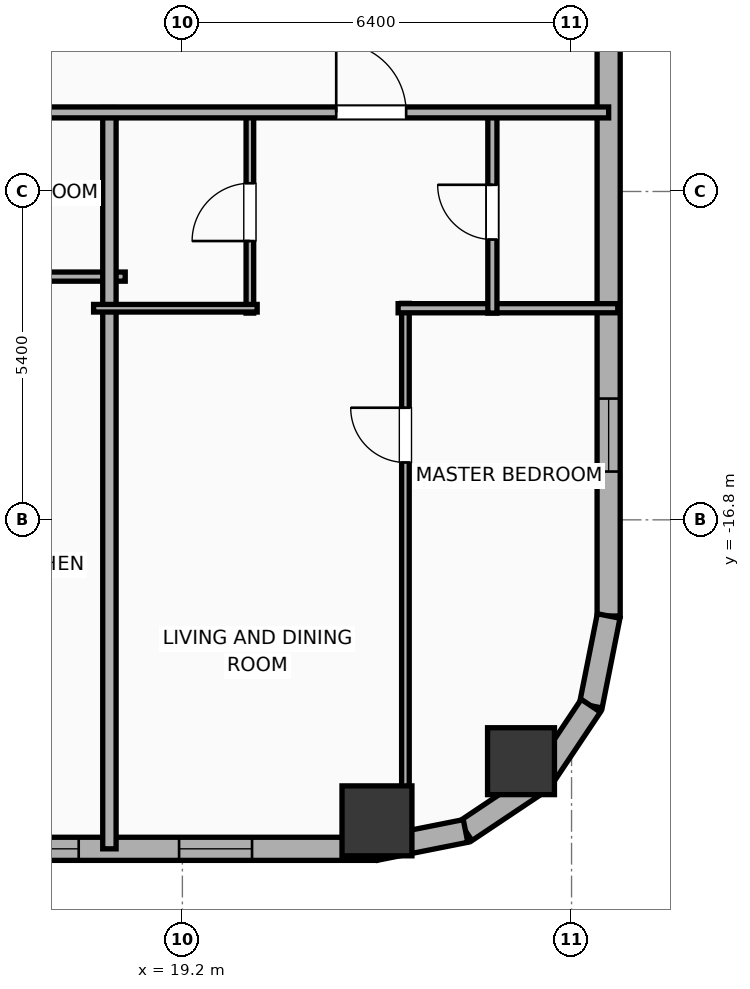
"""IFC4 building model, lengths in metres.
Left out: names, types, materials, properties, quantities, classifications, styles, units other than length and angle.
Written with IfcOpenShell. Run it as: python <this file> out.ifc"""

import sys

from ifc_helpers import new_model, si_unit, direction, frame, frame_2d, origin, origin_2d, place, context, subcontext, project, spatial, rectangle, hollow_rectangle, hollow_circle, extrude, element, fill, save


model = new_model("IFC4")
c1 = context("Model", 3, precision=1e-05, world=origin(), true_north=direction((0.0, 1.0)))
c2 = subcontext(c1, "Body", "Model", "MODEL_VIEW")
j1 = project(units=[si_unit("LENGTHUNIT", "METRE"), si_unit("PLANEANGLEUNIT", "RADIAN")], contexts=[c1])
p1 = place(None, origin())
s1 = spatial("IfcSite", under=j1, at=p1, CompositionType="ELEMENT")
p2 = place(p1, origin())
s2 = spatial("IfcBuilding", under=s1, at=p2, CompositionType="ELEMENT")
p3 = place(p2, frame((0.0, 0.0, 68.9)))
s3 = spatial("IfcBuildingStorey", under=s2, at=p3, CompositionType="ELEMENT", Elevation=68.9)
p4 = place(p3, frame((22.4, -21.75, 0.0), z_axis=(0.0, 0.0, 1.0), x_axis=(1.0, 0.0, 0.0)))
e1 = element("IfcColumn", 1, at=p4, inside=s3, PredefinedType="COLUMN", context=c2, shape_type="SweptSolid", body=[
    extrude(hollow_rectangle(XDim=1.15, YDim=1.15, WallThickness=0.04, at=origin_2d()), origin(), (0.0, 0.0, 1.0), 3.9),
])
p5 = place(p3, frame((24.769, -20.769, 0.0), z_axis=(0.0, 0.0, 1.0), x_axis=(1.0, 0.0, 0.0)))
e2 = element("IfcColumn", 2, at=p5, inside=s3, PredefinedType="COLUMN", context=c2, shape_type="SweptSolid", body=[
    extrude(hollow_circle(Radius=0.55, WallThickness=0.036, at=origin_2d()), origin(), (0.0, 0.0, 1.0), 3.9),
])
p6 = place(p3, frame((22.381, -22.21, 0.0), z_axis=(0.0, 0.0, 1.0), x_axis=(-1.0, 0.0, 0.0)))
e3 = element("IfcWall", 3, at=p6, inside=s3, PredefinedType="ELEMENTEDWALL", context=c2, shape_type="SweptSolid", body=[
    extrude(rectangle(XDim=51.963, YDim=0.38, at=frame_2d((25.981, 0.0))), origin(), (0.0, 0.0, 1.0), 3.65),
])
p7 = place(p6, frame((49.127, 0.0, 0.75)))
e4 = element("IfcOpeningElement", 4, at=p7, cuts=e3, PredefinedType="OPENING", context=c2, shape_type="SweptSolid", body=[
    extrude(rectangle(XDim=1.2, YDim=2.05, at=frame_2d((0.6, 1.025))), frame((0.0, 0.2, 0.0), z_axis=(0.0, -1.0, 0.0), x_axis=(1.0, 0.0, 0.0)), (0.0, 0.0, 1.0), 0.4),
])
p8 = place(p6, frame((43.926, 0.0, 0.75)))
e5 = element("IfcOpeningElement", 5, at=p8, cuts=e3, PredefinedType="OPENING", context=c2, shape_type="SweptSolid", body=[
    extrude(rectangle(XDim=1.2, YDim=2.05, at=frame_2d((0.6, 1.025))), frame((0.0, 0.2, 0.0), z_axis=(0.0, -1.0, 0.0), x_axis=(1.0, 0.0, 0.0)), (0.0, 0.0, 1.0), 0.4),
])
p9 = place(p6, frame((46.676, 0.0, 0.75)))
e6 = element("IfcOpeningElement", 6, at=p9, cuts=e3, PredefinedType="OPENING", context=c2, shape_type="SweptSolid", body=[
    extrude(rectangle(XDim=1.2, YDim=2.05, at=frame_2d((0.6, 1.025))), frame((0.0, 0.2, 0.0), z_axis=(0.0, -1.0, 0.0), x_axis=(1.0, 0.0, 0.0)), (0.0, 0.0, 1.0), 0.4),
])
p10 = place(p6, frame((39.531, 0.0, 0.75)))
e7 = element("IfcOpeningElement", 7, at=p10, cuts=e3, PredefinedType="OPENING", context=c2, shape_type="SweptSolid", body=[
    extrude(rectangle(XDim=1.2, YDim=2.05, at=frame_2d((0.6, 1.025))), frame((0.0, 0.2, 0.0), z_axis=(0.0, -1.0, 0.0), x_axis=(1.0, 0.0, 0.0)), (0.0, 0.0, 1.0), 0.4),
])
p11 = place(p6, frame((32.926, 0.0, 0.75)))
e8 = element("IfcOpeningElement", 8, at=p11, cuts=e3, PredefinedType="OPENING", context=c2, shape_type="SweptSolid", body=[
    extrude(rectangle(XDim=1.2, YDim=2.05, at=frame_2d((0.6, 1.025))), frame((0.0, 0.2, 0.0), z_axis=(0.0, -1.0, 0.0), x_axis=(1.0, 0.0, 0.0)), (0.0, 0.0, 1.0), 0.4),
])
p12 = place(p6, frame((35.676, 0.0, 0.75)))
e9 = element("IfcOpeningElement", 9, at=p12, cuts=e3, PredefinedType="OPENING", context=c2, shape_type="SweptSolid", body=[
    extrude(rectangle(XDim=1.2, YDim=2.05, at=frame_2d((0.6, 1.025))), frame((0.0, 0.2, 0.0), z_axis=(0.0, -1.0, 0.0), x_axis=(1.0, 0.0, 0.0)), (0.0, 0.0, 1.0), 0.4),
])
p13 = place(p6, frame((28.531, 0.0, 0.75)))
e10 = element("IfcOpeningElement", 10, at=p13, cuts=e3, PredefinedType="OPENING", context=c2, shape_type="SweptSolid", body=[
    extrude(rectangle(XDim=1.2, YDim=2.05, at=frame_2d((0.6, 1.025))), frame((0.0, 0.2, 0.0), z_axis=(0.0, -1.0, 0.0), x_axis=(1.0, 0.0, 0.0)), (0.0, 0.0, 1.0), 0.4),
])
p14 = place(p6, frame((21.926, 0.0, 0.75)))
e11 = element("IfcOpeningElement", 11, at=p14, cuts=e3, PredefinedType="OPENING", context=c2, shape_type="SweptSolid", body=[
    extrude(rectangle(XDim=1.2, YDim=2.05, at=frame_2d((0.6, 1.025))), frame((0.0, 0.2, 0.0), z_axis=(0.0, -1.0, 0.0), x_axis=(1.0, 0.0, 0.0)), (0.0, 0.0, 1.0), 0.4),
])
p15 = place(p6, frame((24.676, 0.0, 0.75)))
e12 = element("IfcOpeningElement", 12, at=p15, cuts=e3, PredefinedType="OPENING", context=c2, shape_type="SweptSolid", body=[
    extrude(rectangle(XDim=1.2, YDim=2.05, at=frame_2d((0.6, 1.025))), frame((0.0, 0.2, 0.0), z_axis=(0.0, -1.0, 0.0), x_axis=(1.0, 0.0, 0.0)), (0.0, 0.0, 1.0), 0.4),
])
p16 = place(p6, frame((18.636, 0.0, 0.75)))
e13 = element("IfcOpeningElement", 13, at=p16, cuts=e3, PredefinedType="OPENING", context=c2, shape_type="SweptSolid", body=[
    extrude(rectangle(XDim=1.2, YDim=2.05, at=frame_2d((0.6, 1.025))), frame((0.0, 0.2, 0.0), z_axis=(0.0, -1.0, 0.0), x_axis=(1.0, 0.0, 0.0)), (0.0, 0.0, 1.0), 0.4),
])
p17 = place(p6, frame((15.886, 0.0, 0.75)))
e14 = element("IfcOpeningElement", 14, at=p17, cuts=e3, PredefinedType="OPENING", context=c2, shape_type="SweptSolid", body=[
    extrude(rectangle(XDim=1.2, YDim=2.05, at=frame_2d((0.6, 1.025))), frame((0.0, 0.2, 0.0), z_axis=(0.0, -1.0, 0.0), x_axis=(1.0, 0.0, 0.0)), (0.0, 0.0, 1.0), 0.4),
])
p18 = place(p6, frame((12.031, 0.0, 0.75)))
e15 = element("IfcOpeningElement", 15, at=p18, cuts=e3, PredefinedType="OPENING", context=c2, shape_type="SweptSolid", body=[
    extrude(rectangle(XDim=1.2, YDim=2.05, at=frame_2d((0.6, 1.025))), frame((0.0, 0.2, 0.0), z_axis=(0.0, -1.0, 0.0), x_axis=(1.0, 0.0, 0.0)), (0.0, 0.0, 1.0), 0.4),
])
p19 = place(p6, frame((7.636, 0.0, 0.75)))
e16 = element("IfcOpeningElement", 16, at=p19, cuts=e3, PredefinedType="OPENING", context=c2, shape_type="SweptSolid", body=[
    extrude(rectangle(XDim=1.2, YDim=2.05, at=frame_2d((0.6, 1.025))), frame((0.0, 0.2, 0.0), z_axis=(0.0, -1.0, 0.0), x_axis=(1.0, 0.0, 0.0)), (0.0, 0.0, 1.0), 0.4),
])
p20 = place(p6, frame((4.886, 0.0, 0.75)))
e17 = element("IfcOpeningElement", 17, at=p20, cuts=e3, PredefinedType="OPENING", context=c2, shape_type="SweptSolid", body=[
    extrude(rectangle(XDim=1.2, YDim=2.05, at=frame_2d((0.6, 1.025))), frame((0.0, 0.2, 0.0), z_axis=(0.0, -1.0, 0.0), x_axis=(1.0, 0.0, 0.0)), (0.0, 0.0, 1.0), 0.4),
])
p21 = place(p6, frame((2.036, 0.0, 0.75)))
e18 = element("IfcOpeningElement", 18, at=p21, cuts=e3, PredefinedType="OPENING", context=c2, shape_type="SweptSolid", body=[
    extrude(rectangle(XDim=1.2, YDim=2.05, at=frame_2d((0.6, 1.025))), frame((0.0, 0.2, 0.0), z_axis=(0.0, -1.0, 0.0), x_axis=(1.0, 0.0, 0.0)), (0.0, 0.0, 1.0), 0.4),
])
p22 = place(p3, frame((26.21, 18.381, 0.0), z_axis=(0.0, 0.0, 1.0), x_axis=(0.0, -1.0, 0.0)))
e19 = element("IfcWall", 19, at=p22, inside=s3, PredefinedType="ELEMENTEDWALL", context=c2, shape_type="SweptSolid", body=[
    extrude(rectangle(XDim=36.763, YDim=0.38, at=frame_2d((18.381, 0.0))), origin(), (0.0, 0.0, 1.0), 3.65),
])
p23 = place(p22, frame((33.187, 0.0, 0.75)))
e20 = element("IfcOpeningElement", 20, at=p23, cuts=e19, PredefinedType="OPENING", context=c2, shape_type="SweptSolid", body=[
    extrude(rectangle(XDim=1.2, YDim=2.05, at=frame_2d((0.6, 1.025))), frame((0.0, 0.2, 0.0), z_axis=(0.0, -1.0, 0.0), x_axis=(1.0, 0.0, 0.0)), (0.0, 0.0, 1.0), 0.4),
])
p24 = place(p3, frame((26.21, -18.381, 0.0), z_axis=(0.0, 0.0, 1.0), x_axis=(-0.195086038585, -0.980786132421, 0.0)))
e21 = element("IfcWall", 21, at=p24, inside=s3, PredefinedType="ELEMENTEDWALL", context=c2, shape_type="SweptSolid", body=[
    extrude(rectangle(XDim=1.504, YDim=0.38, at=frame_2d((0.752, 0.0))), origin(), (0.0, 0.0, 1.0), 3.65),
])
for number, where, z_axis, x_axis in (
    (22, (25.917, -19.857, 0.0), (0.0, 0.0, 1.0), (-0.556, -0.831, 0.0)),
    (23, (25.091, -21.091, 0.0), (0.0, 0.0, 1.0), (-0.831, -0.556, 0.0)),
):
    element("IfcWall", number, at=place(p3, frame(where, z_axis=z_axis, x_axis=x_axis)), inside=s3, PredefinedType="ELEMENTEDWALL", context=c2, shape_type="SweptSolid", body=[
        extrude(rectangle(XDim=1.485, YDim=0.38, at=frame_2d((0.743, 0.0))), origin(), (0.0, 0.0, 1.0), 3.65),
    ])
p25 = place(p3, frame((23.857, -21.917, 0.0), z_axis=(0.0, 0.0, 1.0), x_axis=(-0.980786132421, -0.195086038585, 0.0)))
e24 = element("IfcWall", 24, at=p25, inside=s3, PredefinedType="ELEMENTEDWALL", context=c2, shape_type="SweptSolid", body=[
    extrude(rectangle(XDim=1.504, YDim=0.38, at=frame_2d((0.752, 0.0))), origin(), (0.0, 0.0, 1.0), 3.65),
])
p26 = place(p3, frame((15.71, -12.8, 0.0), z_axis=(0.0, 0.0, 1.0), x_axis=(1.0, 0.0, 0.0)))
e25 = element("IfcWall", 25, at=p26, inside=s3, PredefinedType="PLUMBINGWALL", context=c2, shape_type="SweptSolid", body=[
    extrude(rectangle(XDim=2.55, YDim=0.15, at=frame_2d((1.275, 0.0))), origin(), (0.0, 0.0, 1.0), 3.65),
])
p27 = place(p3, frame((18.0, -22.21, 0.0), z_axis=(0.0, 0.0, 1.0), x_axis=(0.0, 1.0, 0.0)))
e26 = element("IfcWall", 26, at=p27, inside=s3, PredefinedType="PARTITIONING", context=c2, shape_type="SweptSolid", body=[
    extrude(rectangle(XDim=12.19, YDim=0.22, at=frame_2d((6.095, 0.0))), origin(), (0.0, 0.0, 1.0), 3.65),
])
p28 = place(p3, frame((22.868, -22.266, 0.0), z_axis=(0.0, 0.0, 1.0), x_axis=(0.0, 1.0, 0.0)))
e27 = element("IfcWall", 27, at=p28, inside=s3, PredefinedType="PARTITIONING", context=c2, shape_type="SweptSolid", body=[
    extrude(rectangle(XDim=9.026, YDim=0.125, at=frame_2d((4.513, 0.0))), origin(), (0.0, 0.0, 1.0), 3.65),
])
p29 = place(p28, frame((6.41, 0.0, 0.0)))
e28 = element("IfcOpeningElement", 28, at=p29, cuts=e27, PredefinedType="OPENING", context=c2, shape_type="SweptSolid", body=[
    extrude(rectangle(XDim=0.9, YDim=2.05, at=frame_2d((0.45, 1.025))), frame((0.0, 0.073, 0.0), z_axis=(0.0, -1.0, 0.0), x_axis=(1.0, 0.0, 0.0)), (0.0, 0.0, 1.0), 0.145),
])
p30 = place(p3, frame((22.748, -13.32, 0.0), z_axis=(0.0, 0.0, 1.0), x_axis=(1.0, 0.0, 0.0)))
e29 = element("IfcWall", 29, at=p30, inside=s3, PredefinedType="PLUMBINGWALL", context=c2, shape_type="SweptSolid", body=[
    extrude(rectangle(XDim=3.612, YDim=0.15, at=frame_2d((1.806, 0.0))), origin(), (0.0, 0.0, 1.0), 3.65),
])
p31 = place(p3, frame((20.31, -13.4, 0.0), z_axis=(0.0, 0.0, 1.0), x_axis=(0.0, 1.0, 0.0)))
e30 = element("IfcWall", 30, at=p31, inside=s3, PredefinedType="PARTITIONING", context=c2, shape_type="SweptSolid", body=[
    extrude(rectangle(XDim=3.32, YDim=0.125, at=frame_2d((1.66, 0.0))), origin(), (0.0, 0.0, 1.0), 2.94),
])
p32 = place(p31, frame((1.185, 0.0, 0.0)))
e31 = element("IfcOpeningElement", 31, at=p32, cuts=e30, PredefinedType="OPENING", context=c2, shape_type="SweptSolid", body=[
    extrude(rectangle(XDim=0.95, YDim=2.05, at=frame_2d((0.475, 1.025))), frame((0.0, 0.073, 0.0), z_axis=(0.0, -1.0, 0.0), x_axis=(1.0, 0.0, 0.0)), (0.0, 0.0, 1.0), 0.145),
])
p33 = place(p3, frame((17.74, -13.32, 0.0), z_axis=(0.0, 0.0, 1.0), x_axis=(1.0, 0.0, 0.0)))
e32 = element("IfcWall", 32, at=p33, inside=s3, PredefinedType="PARTITIONING", context=c2, shape_type="SweptSolid", body=[
    extrude(rectangle(XDim=2.69, YDim=0.125, at=frame_2d((1.345, 0.0))), origin(), (0.0, 0.0, 1.0), 3.65),
])
p34 = place(p3, frame((24.298, -13.4, 0.0), z_axis=(0.0, 0.0, 1.0), x_axis=(0.0, 1.0, 0.0)))
e33 = element("IfcWall", 33, at=p34, inside=s3, PredefinedType="PLUMBINGWALL", context=c2, shape_type="SweptSolid", body=[
    extrude(rectangle(XDim=3.32, YDim=0.15, at=frame_2d((1.66, 0.0))), origin(), (0.0, 0.0, 1.0), 3.65),
])
p35 = place(p34, frame((1.21, 0.0, 0.0)))
e34 = element("IfcOpeningElement", 34, at=p35, cuts=e33, PredefinedType="OPENING", context=c2, shape_type="SweptSolid", body=[
    extrude(rectangle(XDim=0.9, YDim=2.05, at=frame_2d((0.45, 1.025))), frame((0.0, 0.085, 0.0), z_axis=(0.0, -1.0, 0.0), x_axis=(1.0, 0.0, 0.0)), (0.0, 0.0, 1.0), 0.17),
])
p36 = place(p3, frame((-33.41, -10.1, 0.0), z_axis=(0.0, 0.0, 1.0), x_axis=(1.0, 0.0, 0.0)))
e35 = element("IfcWall", 35, at=p36, inside=s3, PredefinedType="PARTITIONING", context=c2, shape_type="SweptSolid", body=[
    extrude(rectangle(XDim=59.62, YDim=0.18, at=frame_2d((29.81, 0.0))), origin(), (0.0, 0.0, 1.0), 3.65),
])
p37 = place(p36, frame((3.259, 0.0, 0.0)))
e36 = element("IfcOpeningElement", 36, at=p37, cuts=e35, PredefinedType="OPENING", context=c2, shape_type="SweptSolid", body=[
    extrude(rectangle(XDim=1.15, YDim=2.05, at=frame_2d((0.575, 1.025))), frame((0.0, 0.1, 0.0), z_axis=(0.0, -1.0, 0.0), x_axis=(1.0, 0.0, 0.0)), (0.0, 0.0, 1.0), 0.2),
])
p38 = place(p36, frame((10.657, 0.0, 0.0)))
e37 = element("IfcOpeningElement", 37, at=p38, cuts=e35, PredefinedType="OPENING", context=c2, shape_type="SweptSolid", body=[
    extrude(rectangle(XDim=1.15, YDim=2.05, at=frame_2d((0.575, 1.025))), frame((0.0, 0.1, 0.0), z_axis=(0.0, -1.0, 0.0), x_axis=(1.0, 0.0, 0.0)), (0.0, 0.0, 1.0), 0.2),
])
p39 = place(p36, frame((15.421, 0.0, 0.0)))
e38 = element("IfcOpeningElement", 38, at=p39, cuts=e35, PredefinedType="OPENING", context=c2, shape_type="SweptSolid", body=[
    extrude(rectangle(XDim=0.9, YDim=2.05, at=frame_2d((0.45, 1.025))), frame((0.0, 0.1, 0.0), z_axis=(0.0, -1.0, 0.0), x_axis=(1.0, 0.0, 0.0)), (0.0, 0.0, 1.0), 0.2),
])
p40 = place(p36, frame((21.657, 0.0, 0.0)))
e39 = element("IfcOpeningElement", 39, at=p40, cuts=e35, PredefinedType="OPENING", context=c2, shape_type="SweptSolid", body=[
    extrude(rectangle(XDim=1.15, YDim=2.05, at=frame_2d((0.575, 1.025))), frame((0.0, 0.1, 0.0), z_axis=(0.0, -1.0, 0.0), x_axis=(1.0, 0.0, 0.0)), (0.0, 0.0, 1.0), 0.2),
])
p41 = place(p36, frame((26.421, 0.0, 0.0)))
e40 = element("IfcOpeningElement", 40, at=p41, cuts=e35, PredefinedType="OPENING", context=c2, shape_type="SweptSolid", body=[
    extrude(rectangle(XDim=0.9, YDim=2.05, at=frame_2d((0.45, 1.025))), frame((0.0, 0.1, 0.0), z_axis=(0.0, -1.0, 0.0), x_axis=(1.0, 0.0, 0.0)), (0.0, 0.0, 1.0), 0.2),
])
p42 = place(p36, frame((32.657, 0.0, 0.0)))
e41 = element("IfcOpeningElement", 41, at=p42, cuts=e35, PredefinedType="OPENING", context=c2, shape_type="SweptSolid", body=[
    extrude(rectangle(XDim=1.15, YDim=2.05, at=frame_2d((0.575, 1.025))), frame((0.0, 0.1, 0.0), z_axis=(0.0, -1.0, 0.0), x_axis=(1.0, 0.0, 0.0)), (0.0, 0.0, 1.0), 0.2),
])
p43 = place(p36, frame((36.008, 0.0, 0.0)))
e42 = element("IfcOpeningElement", 42, at=p43, cuts=e35, PredefinedType="OPENING", context=c2, shape_type="SweptSolid", body=[
    extrude(rectangle(XDim=1.15, YDim=2.05, at=frame_2d((0.575, 1.025))), frame((0.0, 0.1, 0.0), z_axis=(0.0, -1.0, 0.0), x_axis=(1.0, 0.0, 0.0)), (0.0, 0.0, 1.0), 0.2),
])
p44 = place(p36, frame((42.917, 0.0, 0.0)))
e43 = element("IfcOpeningElement", 43, at=p44, cuts=e35, PredefinedType="OPENING", context=c2, shape_type="SweptSolid", body=[
    extrude(rectangle(XDim=0.9, YDim=2.05, at=frame_2d((0.45, 1.025))), frame((0.0, 0.1, 0.0), z_axis=(0.0, -1.0, 0.0), x_axis=(1.0, 0.0, 0.0)), (0.0, 0.0, 1.0), 0.2),
])
p45 = place(p36, frame((47.008, 0.0, 0.0)))
e44 = element("IfcOpeningElement", 44, at=p45, cuts=e35, PredefinedType="OPENING", context=c2, shape_type="SweptSolid", body=[
    extrude(rectangle(XDim=1.15, YDim=2.05, at=frame_2d((0.575, 1.025))), frame((0.0, 0.1, 0.0), z_axis=(0.0, -1.0, 0.0), x_axis=(1.0, 0.0, 0.0)), (0.0, 0.0, 1.0), 0.2),
])
p46 = place(p36, frame((55.14, 0.0, 0.0)))
e45 = element("IfcOpeningElement", 45, at=p46, cuts=e35, PredefinedType="OPENING", context=c2, shape_type="SweptSolid", body=[
    extrude(rectangle(XDim=1.15, YDim=2.05, at=frame_2d((0.575, 1.025))), frame((0.0, 0.1, 0.0), z_axis=(0.0, -1.0, 0.0), x_axis=(1.0, 0.0, 0.0)), (0.0, 0.0, 1.0), 0.2),
])
p47 = place(p20, origin())
e46 = element("IfcWindow", 46, at=p47, inside=s3, PartitioningType="SINGLE_PANEL", PredefinedType="WINDOW", context=c2, shape_type="SweptSolid", body=[
    extrude(rectangle(XDim=1.2, YDim=2.05, at=frame_2d((0.6, 1.025))), frame((0.0, 0.03, 0.0), z_axis=(0.0, -1.0, 0.0), x_axis=(1.0, 0.0, 0.0)), (0.0, 0.0, 1.0), 0.06),
])
fill(e17, e46)
p48 = place(p21, origin())
e47 = element("IfcWindow", 47, at=p48, inside=s3, PartitioningType="SINGLE_PANEL", PredefinedType="WINDOW", context=c2, shape_type="SweptSolid", body=[
    extrude(rectangle(XDim=1.2, YDim=2.05, at=frame_2d((0.6, 1.025))), frame((0.0, 0.03, 0.0), z_axis=(0.0, -1.0, 0.0), x_axis=(1.0, 0.0, 0.0)), (0.0, 0.0, 1.0), 0.06),
])
fill(e18, e47)
p49 = place(p23, origin())
e48 = element("IfcWindow", 48, at=p49, inside=s3, PartitioningType="SINGLE_PANEL", PredefinedType="WINDOW", context=c2, shape_type="SweptSolid", body=[
    extrude(rectangle(XDim=1.2, YDim=2.05, at=frame_2d((0.6, 1.025))), frame((0.0, 0.03, 0.0), z_axis=(0.0, -1.0, 0.0), x_axis=(1.0, 0.0, 0.0)), (0.0, 0.0, 1.0), 0.06),
])
fill(e20, e48)
p50 = place(p29, origin())
e49 = element("IfcDoor", 49, at=p50, inside=s3, OperationType="SINGLE_SWING_RIGHT", PredefinedType="DOOR", context=c2, shape_type="SweptSolid", body=[
    extrude(rectangle(XDim=0.9, YDim=2.05, at=frame_2d((0.45, 1.025))), frame((0.0, 0.025, 0.0), z_axis=(0.0, -1.0, 0.0), x_axis=(1.0, 0.0, 0.0)), (0.0, 0.0, 1.0), 0.05),
])
fill(e28, e49)
p51 = place(p32, origin())
e50 = element("IfcDoor", 50, at=p51, inside=s3, OperationType="SINGLE_SWING_LEFT", PredefinedType="DOOR", context=c2, shape_type="SweptSolid", body=[
    extrude(rectangle(XDim=0.95, YDim=2.05, at=frame_2d((0.475, 1.025))), frame((0.0, 0.025, 0.0), z_axis=(0.0, -1.0, 0.0), x_axis=(1.0, 0.0, 0.0)), (0.0, 0.0, 1.0), 0.05),
])
fill(e31, e50)
p52 = place(p35, origin())
e51 = element("IfcDoor", 51, at=p52, inside=s3, OperationType="SINGLE_SWING_RIGHT", PredefinedType="DOOR", context=c2, shape_type="SweptSolid", body=[
    extrude(rectangle(XDim=0.9, YDim=2.05, at=frame_2d((0.45, 1.025))), frame((0.0, 0.025, 0.0), z_axis=(0.0, -1.0, 0.0), x_axis=(1.0, 0.0, 0.0)), (0.0, 0.0, 1.0), 0.05),
])
fill(e34, e51)
p53 = place(p46, origin())
e52 = element("IfcDoor", 52, at=p53, inside=s3, OperationType="SINGLE_SWING_LEFT", PredefinedType="DOOR", context=c2, shape_type="SweptSolid", body=[
    extrude(rectangle(XDim=1.15, YDim=2.05, at=frame_2d((0.575, 1.025))), frame((0.0, 0.025, 0.0), z_axis=(0.0, -1.0, 0.0), x_axis=(1.0, 0.0, 0.0)), (0.0, 0.0, 1.0), 0.05),
])
fill(e45, e52)
save(model, sys.argv[1])
